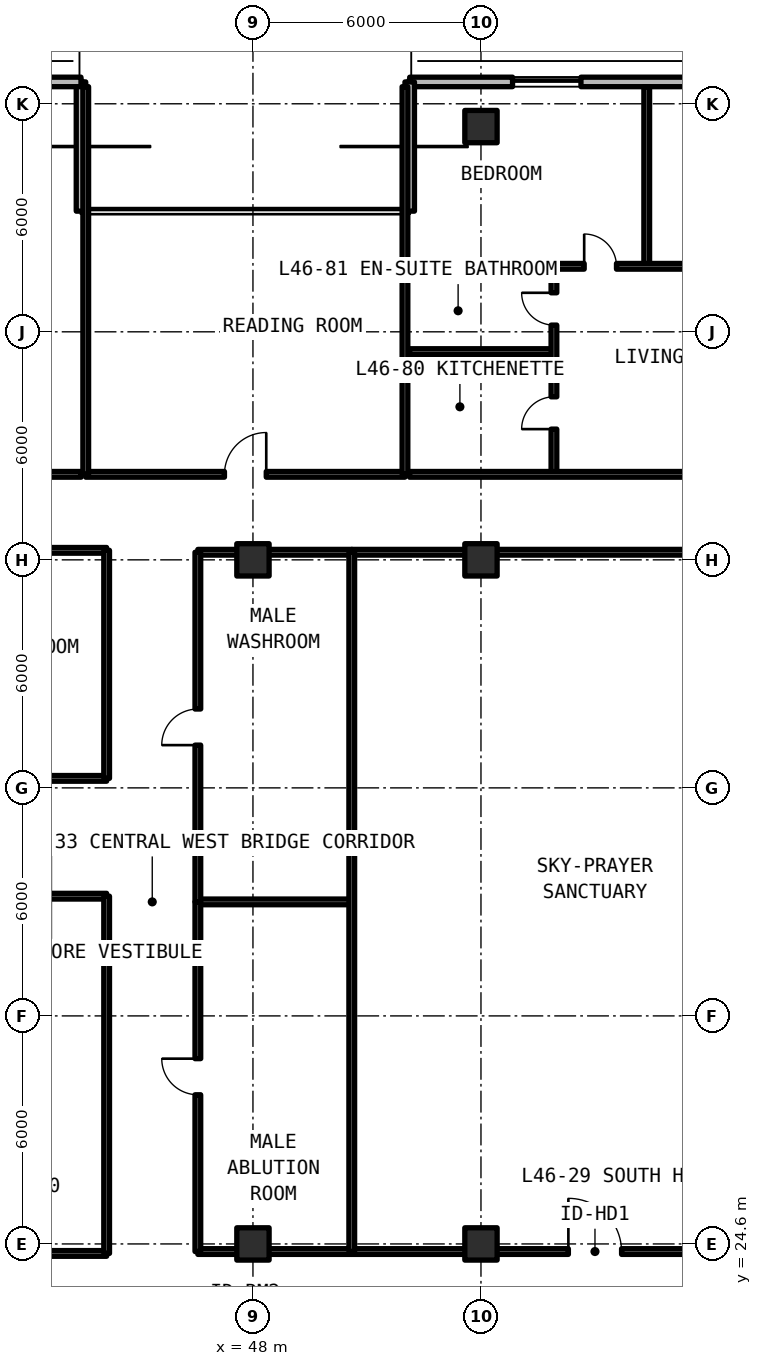
"""IFC4 building model, lengths in metres.
Left out: names, types, materials, properties, quantities, classifications, styles, units other than length and angle.
Written with IfcOpenShell. Run it as: python <this file> out.ifc"""

import sys

from ifc_helpers import new_model, si_unit, direction, frame, frame_2d, origin, origin_2d, place, context, subcontext, project, spatial, rectangle, extrude, element, fill, save


model = new_model("IFC4")
c1 = context("Model", 3, precision=1e-05, world=origin(), true_north=direction((0.0, 1.0)))
c2 = subcontext(c1, "Body", "Model", "MODEL_VIEW")
j1 = project(units=[si_unit("LENGTHUNIT", "METRE"), si_unit("PLANEANGLEUNIT", "RADIAN")], contexts=[c1])
p1 = place(None, origin())
s1 = spatial("IfcSite", under=j1, at=p1, CompositionType="ELEMENT")
p2 = place(p1, origin())
s2 = spatial("IfcBuilding", under=s1, at=p2, CompositionType="ELEMENT")
p3 = place(p2, frame((0.0, 0.0, 165.66)))
s3 = spatial("IfcBuildingStorey", under=s2, at=p3, CompositionType="ELEMENT", Elevation=165.66)
for number, where, z_axis, x_axis in (
    (1, (48.0, 24.6, 0.0), (0.0, 0.0, 1.0), (1.0, 0.0, 0.0)),
    (2, (48.0, 42.6, 0.0), (0.0, 0.0, 1.0), (1.0, 0.0, 0.0)),
    (3, (54.0, 24.6, 0.0), (0.0, 0.0, 1.0), (1.0, 0.0, 0.0)),
    (4, (54.0, 42.6, 0.0), (0.0, 0.0, 1.0), (1.0, 0.0, 0.0)),
    (5, (54.0, 54.0, 0.0), (0.0, 0.0, 1.0), (1.0, 0.0, 0.0)),
):
    element("IfcColumn", number, at=place(p3, frame(where, z_axis=z_axis, x_axis=x_axis)), inside=s3, PredefinedType="COLUMN", context=c2, shape_type="SweptSolid", body=[
        extrude(rectangle(XDim=0.85, YDim=0.85, at=origin_2d()), origin(), (0.0, 0.0, 1.0), 3.63),
    ])
p4 = place(p3, frame((95.748, 55.175, 0.0), z_axis=(0.0, 0.0, 1.0), x_axis=(-1.0, 0.0, 0.0)))
e6 = element("IfcWall", 6, at=p4, inside=s3, PredefinedType="SOLIDWALL", context=c2, shape_type="SweptSolid", body=[
    extrude(rectangle(XDim=43.623, YDim=0.25, at=frame_2d((21.812, 0.0))), origin(), (0.0, 0.0, 1.0), 3.41),
])
p5 = place(p4, frame((26.798, 0.0, 0.0)))
e7 = element("IfcOpeningElement", 7, at=p5, cuts=e6, PredefinedType="OPENING", context=c2, shape_type="SweptSolid", body=[
    extrude(rectangle(XDim=1.1, YDim=2.15, at=frame_2d((0.55, 1.075))), frame((0.0, 0.135, 0.0), z_axis=(0.0, -1.0, 0.0), x_axis=(1.0, 0.0, 0.0)), (0.0, 0.0, 1.0), 0.27),
])
p6 = place(p4, frame((19.448, 0.0, 0.0)))
e8 = element("IfcOpeningElement", 8, at=p6, cuts=e6, PredefinedType="OPENING", context=c2, shape_type="SweptSolid", body=[
    extrude(rectangle(XDim=1.1, YDim=2.15, at=frame_2d((0.55, 1.075))), frame((0.0, 0.135, 0.0), z_axis=(0.0, -1.0, 0.0), x_axis=(1.0, 0.0, 0.0)), (0.0, 0.0, 1.0), 0.27),
])
p7 = place(p4, frame((39.117, 0.0, 0.78)))
e9 = element("IfcOpeningElement", 9, at=p7, cuts=e6, PredefinedType="OPENING", context=c2, shape_type="SweptSolid", body=[
    extrude(rectangle(XDim=1.8, YDim=1.66, at=frame_2d((0.9, 0.83))), frame((0.0, 0.135, 0.0), z_axis=(0.0, -1.0, 0.0), x_axis=(1.0, 0.0, 0.0)), (0.0, 0.0, 1.0), 0.27),
])
p8 = place(p4, frame((33.135, 0.0, 0.78)))
e10 = element("IfcOpeningElement", 10, at=p8, cuts=e6, PredefinedType="OPENING", context=c2, shape_type="SweptSolid", body=[
    extrude(rectangle(XDim=1.8, YDim=1.66, at=frame_2d((0.9, 0.83))), frame((0.0, 0.135, 0.0), z_axis=(0.0, -1.0, 0.0), x_axis=(1.0, 0.0, 0.0)), (0.0, 0.0, 1.0), 0.27),
])
p9 = place(p4, frame((12.563, 0.0, 0.78)))
e11 = element("IfcOpeningElement", 11, at=p9, cuts=e6, PredefinedType="OPENING", context=c2, shape_type="SweptSolid", body=[
    extrude(rectangle(XDim=1.8, YDim=1.66, at=frame_2d((0.9, 0.83))), frame((0.0, 0.135, 0.0), z_axis=(0.0, -1.0, 0.0), x_axis=(1.0, 0.0, 0.0)), (0.0, 0.0, 1.0), 0.27),
])
p10 = place(p4, frame((3.116, 0.0, 0.78)))
e12 = element("IfcOpeningElement", 12, at=p10, cuts=e6, PredefinedType="OPENING", context=c2, shape_type="SweptSolid", body=[
    extrude(rectangle(XDim=1.8, YDim=1.66, at=frame_2d((0.9, 0.83))), frame((0.0, 0.135, 0.0), z_axis=(0.0, -1.0, 0.0), x_axis=(1.0, 0.0, 0.0)), (0.0, 0.0, 1.0), 0.27),
])
for number, where, z_axis, x_axis in (
    (13, (52.125, 55.175, 0.0), (0.0, 0.0, 1.0), (0.0, -1.0, 0.0)),
    (14, (43.475, 51.775, 0.0), (0.0, 0.0, 1.0), (0.0, 1.0, 0.0)),
):
    element("IfcWall", number, at=place(p3, frame(where, z_axis=z_axis, x_axis=x_axis)), inside=s3, PredefinedType="SOLIDWALL", context=c2, shape_type="SweptSolid", body=[
        extrude(rectangle(XDim=3.4, YDim=0.25, at=frame_2d((1.7, 0.0))), origin(), (0.0, 0.0, 1.0), 3.41),
    ])
p11 = place(p3, frame((43.475, 55.175, 0.0), z_axis=(0.0, 0.0, 1.0), x_axis=(-1.0, 0.0, 0.0)))
e15 = element("IfcWall", 15, at=p11, inside=s3, PredefinedType="SOLIDWALL", context=c2, shape_type="SweptSolid", body=[
    extrude(rectangle(XDim=19.623, YDim=0.25, at=frame_2d((9.812, 0.0))), origin(), (0.0, 0.0, 1.0), 3.41),
])
p12 = place(p11, frame((10.575, 0.0, 0.0)))
e16 = element("IfcOpeningElement", 16, at=p12, cuts=e15, PredefinedType="OPENING", context=c2, shape_type="SweptSolid", body=[
    extrude(rectangle(XDim=1.1, YDim=2.15, at=frame_2d((0.55, 1.075))), frame((0.0, 0.135, 0.0), z_axis=(0.0, -1.0, 0.0), x_axis=(1.0, 0.0, 0.0)), (0.0, 0.0, 1.0), 0.27),
])
p13 = place(p11, frame((18.08, 0.0, 0.78)))
e17 = element("IfcOpeningElement", 17, at=p13, cuts=e15, PredefinedType="OPENING", context=c2, shape_type="SweptSolid", body=[
    extrude(rectangle(XDim=0.85, YDim=1.65, at=frame_2d((0.425, 0.825))), frame((0.0, 0.135, 0.0), z_axis=(0.0, -1.0, 0.0), x_axis=(1.0, 0.0, 0.0)), (0.0, 0.0, 1.0), 0.27),
])
p14 = place(p11, frame((15.596, 0.0, 0.78)))
e18 = element("IfcOpeningElement", 18, at=p14, cuts=e15, PredefinedType="OPENING", context=c2, shape_type="SweptSolid", body=[
    extrude(rectangle(XDim=1.4, YDim=1.65, at=frame_2d((0.7, 0.825))), frame((0.0, 0.135, 0.0), z_axis=(0.0, -1.0, 0.0), x_axis=(1.0, 0.0, 0.0)), (0.0, 0.0, 1.0), 0.27),
])
p15 = place(p11, frame((8.369, 0.0, 0.78)))
e19 = element("IfcOpeningElement", 19, at=p15, cuts=e15, PredefinedType="OPENING", context=c2, shape_type="SweptSolid", body=[
    extrude(rectangle(XDim=0.85, YDim=1.65, at=frame_2d((0.425, 0.825))), frame((0.0, 0.135, 0.0), z_axis=(0.0, -1.0, 0.0), x_axis=(1.0, 0.0, 0.0)), (0.0, 0.0, 1.0), 0.27),
])
p16 = place(p11, frame((2.809, 0.0, 0.78)))
e20 = element("IfcOpeningElement", 20, at=p16, cuts=e15, PredefinedType="OPENING", context=c2, shape_type="SweptSolid", body=[
    extrude(rectangle(XDim=1.8, YDim=1.66, at=frame_2d((0.9, 0.83))), frame((0.0, 0.135, 0.0), z_axis=(0.0, -1.0, 0.0), x_axis=(1.0, 0.0, 0.0)), (0.0, 0.0, 1.0), 0.27),
])
p17 = place(p3, frame((36.27, 24.35, 0.0), z_axis=(0.0, 0.0, 1.0), x_axis=(1.0, 0.0, 0.0)))
e21 = element("IfcWall", 21, at=p17, inside=s3, PredefinedType="SOLIDWALL", context=c2, shape_type="SweptSolid", body=[
    extrude(rectangle(XDim=7.88, YDim=0.15, at=frame_2d((3.94, 0.0))), origin(), (0.0, 0.0, 1.0), 2.63),
])
p18 = place(p3, frame((36.27, 33.75, 0.0), z_axis=(0.0, 0.0, 1.0), x_axis=(1.0, 0.0, 0.0)))
e22 = element("IfcWall", 22, at=p18, inside=s3, PredefinedType="SOLIDWALL", context=c2, shape_type="SweptSolid", body=[
    extrude(rectangle(XDim=7.88, YDim=0.15, at=frame_2d((3.94, 0.0))), origin(), (0.0, 0.0, 1.0), 2.63),
])
p19 = place(p18, frame((3.465, 0.0, 0.0)))
e23 = element("IfcOpeningElement", 23, at=p19, cuts=e22, PredefinedType="OPENING", context=c2, shape_type="SweptSolid", body=[
    extrude(rectangle(XDim=0.95, YDim=2.15, at=frame_2d((0.475, 1.075))), frame((0.0, 0.085, 0.0), z_axis=(0.0, -1.0, 0.0), x_axis=(1.0, 0.0, 0.0)), (0.0, 0.0, 1.0), 0.17),
])
p20 = place(p3, frame((44.15, 24.35, 0.0), z_axis=(0.0, 0.0, 1.0), x_axis=(0.0, 1.0, 0.0)))
e24 = element("IfcWall", 24, at=p20, inside=s3, PredefinedType="SOLIDWALL", context=c2, shape_type="SweptSolid", body=[
    extrude(rectangle(XDim=9.4, YDim=0.15, at=frame_2d((4.7, 0.0))), origin(), (0.0, 0.0, 1.0), 2.63),
])
p21 = place(p3, frame((36.27, 36.85, 0.0), z_axis=(0.0, 0.0, 1.0), x_axis=(1.0, 0.0, 0.0)))
e25 = element("IfcWall", 25, at=p21, inside=s3, PredefinedType="SOLIDWALL", context=c2, shape_type="SweptSolid", body=[
    extrude(rectangle(XDim=7.88, YDim=0.15, at=frame_2d((3.94, 0.0))), origin(), (0.0, 0.0, 1.0), 2.63),
])
p22 = place(p21, frame((3.465, 0.0, 0.0)))
e26 = element("IfcOpeningElement", 26, at=p22, cuts=e25, PredefinedType="OPENING", context=c2, shape_type="SweptSolid", body=[
    extrude(rectangle(XDim=0.95, YDim=2.15, at=frame_2d((0.475, 1.075))), frame((0.0, 0.085, 0.0), z_axis=(0.0, -1.0, 0.0), x_axis=(1.0, 0.0, 0.0)), (0.0, 0.0, 1.0), 0.17),
])
p23 = place(p3, frame((36.27, 42.85, 0.0), z_axis=(0.0, 0.0, 1.0), x_axis=(1.0, 0.0, 0.0)))
e27 = element("IfcWall", 27, at=p23, inside=s3, PredefinedType="SOLIDWALL", context=c2, shape_type="SweptSolid", body=[
    extrude(rectangle(XDim=7.88, YDim=0.15, at=frame_2d((3.94, 0.0))), origin(), (0.0, 0.0, 1.0), 2.63),
])
p24 = place(p3, frame((44.15, 36.85, 0.0), z_axis=(0.0, 0.0, 1.0), x_axis=(0.0, 1.0, 0.0)))
e28 = element("IfcWall", 28, at=p24, inside=s3, PredefinedType="SOLIDWALL", context=c2, shape_type="SweptSolid", body=[
    extrude(rectangle(XDim=6.0, YDim=0.15, at=frame_2d((3.0, 0.0))), origin(), (0.0, 0.0, 1.0), 2.63),
])
for number, where, z_axis, x_axis in (
    (29, (46.55, 24.4, 0.0), (0.0, 0.0, 1.0), (1.0, 0.0, 0.0)),
    (30, (46.55, 33.6, 0.0), (0.0, 0.0, 1.0), (1.0, 0.0, 0.0)),
):
    element("IfcWall", number, at=place(p3, frame(where, z_axis=z_axis, x_axis=x_axis)), inside=s3, PredefinedType="SOLIDWALL", context=c2, shape_type="SweptSolid", body=[
        extrude(rectangle(XDim=4.05, YDim=0.15, at=frame_2d((2.025, 0.0))), origin(), (0.0, 0.0, 1.0), 2.63),
    ])
p25 = place(p3, frame((46.55, 24.4, 0.0), z_axis=(0.0, 0.0, 1.0), x_axis=(0.0, 1.0, 0.0)))
e31 = element("IfcWall", 31, at=p25, inside=s3, PredefinedType="SOLIDWALL", context=c2, shape_type="SweptSolid", body=[
    extrude(rectangle(XDim=9.2, YDim=0.15, at=frame_2d((4.6, 0.0))), origin(), (0.0, 0.0, 1.0), 2.63),
])
p26 = place(p25, frame((4.125, 0.0, 0.0)))
e32 = element("IfcOpeningElement", 32, at=p26, cuts=e31, PredefinedType="OPENING", context=c2, shape_type="SweptSolid", body=[
    extrude(rectangle(XDim=0.95, YDim=2.15, at=frame_2d((0.475, 1.075))), frame((0.0, 0.085, 0.0), z_axis=(0.0, -1.0, 0.0), x_axis=(1.0, 0.0, 0.0)), (0.0, 0.0, 1.0), 0.17),
])
p27 = place(p3, frame((46.55, 42.8, 0.0), z_axis=(0.0, 0.0, 1.0), x_axis=(1.0, 0.0, 0.0)))
e33 = element("IfcWall", 33, at=p27, inside=s3, PredefinedType="SOLIDWALL", context=c2, shape_type="SweptSolid", body=[
    extrude(rectangle(XDim=4.05, YDim=0.15, at=frame_2d((2.025, 0.0))), origin(), (0.0, 0.0, 1.0), 2.63),
])
p28 = place(p3, frame((46.55, 33.6, 0.0), z_axis=(0.0, 0.0, 1.0), x_axis=(0.0, 1.0, 0.0)))
e34 = element("IfcWall", 34, at=p28, inside=s3, PredefinedType="SOLIDWALL", context=c2, shape_type="SweptSolid", body=[
    extrude(rectangle(XDim=9.2, YDim=0.15, at=frame_2d((4.6, 0.0))), origin(), (0.0, 0.0, 1.0), 2.63),
])
p29 = place(p28, frame((4.125, 0.0, 0.0)))
e35 = element("IfcOpeningElement", 35, at=p29, cuts=e34, PredefinedType="OPENING", context=c2, shape_type="SweptSolid", body=[
    extrude(rectangle(XDim=0.95, YDim=2.15, at=frame_2d((0.475, 1.075))), frame((0.0, 0.085, 0.0), z_axis=(0.0, -1.0, 0.0), x_axis=(1.0, 0.0, 0.0)), (0.0, 0.0, 1.0), 0.17),
])
p30 = place(p3, frame((50.6, 24.4, 0.0), z_axis=(0.0, 0.0, 1.0), x_axis=(1.0, 0.0, 0.0)))
e36 = element("IfcWall", 36, at=p30, inside=s3, PredefinedType="SOLIDWALL", context=c2, shape_type="SweptSolid", body=[
    extrude(rectangle(XDim=12.8, YDim=0.15, at=frame_2d((6.4, 0.0))), origin(), (0.0, 0.0, 1.0), 2.63),
])
p31 = place(p30, frame((5.7, 0.0, 0.0)))
e37 = element("IfcOpeningElement", 37, at=p31, cuts=e36, PredefinedType="OPENING", context=c2, shape_type="SweptSolid", body=[
    extrude(rectangle(XDim=1.4, YDim=2.15, at=frame_2d((0.7, 1.075))), frame((0.0, 0.085, 0.0), z_axis=(0.0, -1.0, 0.0), x_axis=(1.0, 0.0, 0.0)), (0.0, 0.0, 1.0), 0.17),
])
p32 = place(p3, frame((50.6, 42.8, 0.0), z_axis=(0.0, 0.0, 1.0), x_axis=(1.0, 0.0, 0.0)))
e38 = element("IfcWall", 38, at=p32, inside=s3, PredefinedType="SOLIDWALL", context=c2, shape_type="SweptSolid", body=[
    extrude(rectangle(XDim=12.8, YDim=0.15, at=frame_2d((6.4, 0.0))), origin(), (0.0, 0.0, 1.0), 2.63),
])
p33 = place(p3, frame((50.6, 24.4, 0.0), z_axis=(0.0, 0.0, 1.0), x_axis=(0.0, 1.0, 0.0)))
e39 = element("IfcWall", 39, at=p33, inside=s3, PredefinedType="SOLIDWALL", context=c2, shape_type="SweptSolid", body=[
    extrude(rectangle(XDim=18.4, YDim=0.15, at=frame_2d((9.2, 0.0))), origin(), (0.0, 0.0, 1.0), 2.63),
])
p34 = place(p3, frame((43.6, 44.85, 0.0), z_axis=(0.0, 0.0, 1.0), x_axis=(1.0, 0.0, 0.0)))
e40 = element("IfcWall", 40, at=p34, inside=s3, PredefinedType="SOLIDWALL", context=c2, shape_type="SweptSolid", body=[
    extrude(rectangle(XDim=8.4, YDim=0.15, at=frame_2d((4.2, 0.0))), origin(), (0.0, 0.0, 1.0), 2.63),
])
p35 = place(p34, frame((3.65, 0.0, 0.0)))
e41 = element("IfcOpeningElement", 41, at=p35, cuts=e40, PredefinedType="OPENING", context=c2, shape_type="SweptSolid", body=[
    extrude(rectangle(XDim=1.1, YDim=2.15, at=frame_2d((0.55, 1.075))), frame((0.0, 0.085, 0.0), z_axis=(0.0, -1.0, 0.0), x_axis=(1.0, 0.0, 0.0)), (0.0, 0.0, 1.0), 0.17),
])
for number, where, z_axis, x_axis in (
    (42, (43.6, 44.85, 0.0), (0.0, 0.0, 1.0), (0.0, 1.0, 0.0)),
    (43, (52.0, 44.85, 0.0), (0.0, 0.0, 1.0), (0.0, 1.0, 0.0)),
):
    element("IfcWall", number, at=place(p3, frame(where, z_axis=z_axis, x_axis=x_axis)), inside=s3, PredefinedType="SOLIDWALL", context=c2, shape_type="SweptSolid", body=[
        extrude(rectangle(XDim=10.2, YDim=0.15, at=frame_2d((5.1, 0.0))), origin(), (0.0, 0.0, 1.0), 2.63),
    ])
p36 = place(p3, frame((36.051, 44.85, 0.0), z_axis=(0.0, 0.0, 1.0), x_axis=(1.0, 0.0, 0.0)))
e44 = element("IfcWall", 44, at=p36, inside=s3, PredefinedType="SOLIDWALL", context=c2, shape_type="SweptSolid", body=[
    extrude(rectangle(XDim=7.429, YDim=0.15, at=frame_2d((3.714, 0.0))), origin(), (0.0, 0.0, 1.0), 2.63),
])
p37 = place(p36, frame((3.164, 0.0, 0.0)))
e45 = element("IfcOpeningElement", 45, at=p37, cuts=e44, PredefinedType="OPENING", context=c2, shape_type="SweptSolid", body=[
    extrude(rectangle(XDim=1.1, YDim=2.15, at=frame_2d((0.55, 1.075))), frame((0.0, 0.085, 0.0), z_axis=(0.0, -1.0, 0.0), x_axis=(1.0, 0.0, 0.0)), (0.0, 0.0, 1.0), 0.17),
])
p38 = place(p3, frame((52.12, 48.08, 0.0), z_axis=(0.0, 0.0, 1.0), x_axis=(1.0, 0.0, 0.0)))
e46 = element("IfcWall", 46, at=p38, inside=s3, PredefinedType="PARTITIONING", context=c2, shape_type="SweptSolid", body=[
    extrude(rectangle(XDim=3.8, YDim=0.15, at=frame_2d((1.9, 0.0))), origin(), (0.0, 0.0, 1.0), 2.63),
])
p39 = place(p3, frame((55.92, 44.85, 0.0), z_axis=(0.0, 0.0, 1.0), x_axis=(0.0, 1.0, 0.0)))
e47 = element("IfcWall", 47, at=p39, inside=s3, PredefinedType="PARTITIONING", context=c2, shape_type="SweptSolid", body=[
    extrude(rectangle(XDim=5.474, YDim=0.15, at=frame_2d((2.737, 0.0))), origin(), (0.0, 0.0, 1.0), 2.63),
])
p40 = place(p39, frame((1.19, 0.0, 0.0)))
e48 = element("IfcOpeningElement", 48, at=p40, cuts=e47, PredefinedType="OPENING", context=c2, shape_type="SweptSolid", body=[
    extrude(rectangle(XDim=0.85, YDim=2.1, at=frame_2d((0.425, 1.05))), frame((0.0, 0.085, 0.0), z_axis=(0.0, -1.0, 0.0), x_axis=(1.0, 0.0, 0.0)), (0.0, 0.0, 1.0), 0.17),
])
p41 = place(p39, frame((3.927, 0.0, 0.0)))
e49 = element("IfcOpeningElement", 49, at=p41, cuts=e47, PredefinedType="OPENING", context=c2, shape_type="SweptSolid", body=[
    extrude(rectangle(XDim=0.85, YDim=2.1, at=frame_2d((0.425, 1.05))), frame((0.0, 0.085, 0.0), z_axis=(0.0, -1.0, 0.0), x_axis=(1.0, 0.0, 0.0)), (0.0, 0.0, 1.0), 0.17),
])
p42 = place(p3, frame((58.362, 50.324, 0.0), z_axis=(0.0, 0.0, 1.0), x_axis=(0.0, 1.0, 0.0)))
e50 = element("IfcWall", 50, at=p42, inside=s3, PredefinedType="PARTITIONING", context=c2, shape_type="SweptSolid", body=[
    extrude(rectangle(XDim=4.726, YDim=0.15, at=frame_2d((2.363, 0.0))), origin(), (0.0, 0.0, 1.0), 2.63),
])
p43 = place(p3, frame((52.12, 50.324, 0.0), z_axis=(0.0, 0.0, 1.0), x_axis=(1.0, 0.0, 0.0)))
e51 = element("IfcWall", 51, at=p43, inside=s3, PredefinedType="PARTITIONING", context=c2, shape_type="SweptSolid", body=[
    extrude(rectangle(XDim=12.004, YDim=0.15, at=frame_2d((6.002, 0.0))), origin(), (0.0, 0.0, 1.0), 2.63),
])
p44 = place(p43, frame((4.596, 0.0, 0.0)))
e52 = element("IfcOpeningElement", 52, at=p44, cuts=e51, PredefinedType="OPENING", context=c2, shape_type="SweptSolid", body=[
    extrude(rectangle(XDim=0.85, YDim=2.1, at=frame_2d((0.425, 1.05))), frame((0.0, 0.085, 0.0), z_axis=(0.0, -1.0, 0.0), x_axis=(1.0, 0.0, 0.0)), (0.0, 0.0, 1.0), 0.17),
])
p45 = place(p43, frame((8.698, 0.0, 0.0)))
e53 = element("IfcOpeningElement", 53, at=p45, cuts=e51, PredefinedType="OPENING", context=c2, shape_type="SweptSolid", body=[
    extrude(rectangle(XDim=0.85, YDim=2.1, at=frame_2d((0.425, 1.05))), frame((0.0, 0.085, 0.0), z_axis=(0.0, -1.0, 0.0), x_axis=(1.0, 0.0, 0.0)), (0.0, 0.0, 1.0), 0.17),
])
p46 = place(p3, frame((52.12, 44.85, 0.0), z_axis=(0.0, 0.0, 1.0), x_axis=(1.0, 0.0, 0.0)))
e54 = element("IfcWall", 54, at=p46, inside=s3, PredefinedType="SOLIDWALL", context=c2, shape_type="SweptSolid", body=[
    extrude(rectangle(XDim=12.004, YDim=0.15, at=frame_2d((6.002, 0.0))), origin(), (0.0, 0.0, 1.0), 2.63),
])
p47 = place(p46, frame((7.467, 0.0, 0.0)))
e55 = element("IfcOpeningElement", 55, at=p47, cuts=e54, PredefinedType="OPENING", context=c2, shape_type="SweptSolid", body=[
    extrude(rectangle(XDim=0.95, YDim=2.15, at=frame_2d((0.475, 1.075))), frame((0.0, 0.085, 0.0), z_axis=(0.0, -1.0, 0.0), x_axis=(1.0, 0.0, 0.0)), (0.0, 0.0, 1.0), 0.17),
])
p48 = place(p7, origin())
e56 = element("IfcWindow", 56, at=p48, inside=s3, PartitioningType="SINGLE_PANEL", PredefinedType="WINDOW", context=c2, shape_type="SweptSolid", body=[
    extrude(rectangle(XDim=1.8, YDim=1.66, at=frame_2d((0.9, 0.83))), frame((0.0, 0.03, 0.0), z_axis=(0.0, -1.0, 0.0), x_axis=(1.0, 0.0, 0.0)), (0.0, 0.0, 1.0), 0.06),
])
fill(e9, e56)
p49 = place(p26, origin())
e57 = element("IfcDoor", 57, at=p49, inside=s3, OperationType="SINGLE_SWING_RIGHT", PredefinedType="DOOR", context=c2, shape_type="SweptSolid", body=[
    extrude(rectangle(XDim=0.95, YDim=2.15, at=frame_2d((0.475, 1.075))), frame((0.0, 0.025, 0.0), z_axis=(0.0, -1.0, 0.0), x_axis=(1.0, 0.0, 0.0)), (0.0, 0.0, 1.0), 0.05),
])
fill(e32, e57)
p50 = place(p29, origin())
e58 = element("IfcDoor", 58, at=p50, inside=s3, OperationType="SINGLE_SWING_LEFT", PredefinedType="DOOR", context=c2, shape_type="SweptSolid", body=[
    extrude(rectangle(XDim=0.95, YDim=2.15, at=frame_2d((0.475, 1.075))), frame((0.0, 0.025, 0.0), z_axis=(0.0, -1.0, 0.0), x_axis=(1.0, 0.0, 0.0)), (0.0, 0.0, 1.0), 0.05),
])
fill(e35, e58)
p51 = place(p31, origin())
e59 = element("IfcDoor", 59, at=p51, inside=s3, OperationType="SINGLE_SWING_RIGHT", PredefinedType="DOOR", context=c2, shape_type="SweptSolid", body=[
    extrude(rectangle(XDim=1.4, YDim=2.15, at=frame_2d((0.7, 1.075))), frame((0.0, 0.025, 0.0), z_axis=(0.0, -1.0, 0.0), x_axis=(1.0, 0.0, 0.0)), (0.0, 0.0, 1.0), 0.05),
])
fill(e37, e59)
p52 = place(p35, origin())
e60 = element("IfcDoor", 60, at=p52, inside=s3, OperationType="SINGLE_SWING_RIGHT", PredefinedType="DOOR", context=c2, shape_type="SweptSolid", body=[
    extrude(rectangle(XDim=1.1, YDim=2.15, at=frame_2d((0.55, 1.075))), frame((0.0, 0.025, 0.0), z_axis=(0.0, -1.0, 0.0), x_axis=(1.0, 0.0, 0.0)), (0.0, 0.0, 1.0), 0.05),
])
fill(e41, e60)
p53 = place(p40, origin())
e61 = element("IfcDoor", 61, at=p53, inside=s3, OperationType="SINGLE_SWING_LEFT", PredefinedType="DOOR", context=c2, shape_type="SweptSolid", body=[
    extrude(rectangle(XDim=0.85, YDim=2.1, at=frame_2d((0.425, 1.05))), frame((0.0, 0.025, 0.0), z_axis=(0.0, -1.0, 0.0), x_axis=(1.0, 0.0, 0.0)), (0.0, 0.0, 1.0), 0.05),
])
fill(e48, e61)
p54 = place(p41, origin())
e62 = element("IfcDoor", 62, at=p54, inside=s3, OperationType="SINGLE_SWING_RIGHT", PredefinedType="DOOR", context=c2, shape_type="SweptSolid", body=[
    extrude(rectangle(XDim=0.85, YDim=2.1, at=frame_2d((0.425, 1.05))), frame((0.0, 0.025, 0.0), z_axis=(0.0, -1.0, 0.0), x_axis=(1.0, 0.0, 0.0)), (0.0, 0.0, 1.0), 0.05),
])
fill(e49, e62)
p55 = place(p44, origin())
e63 = element("IfcDoor", 63, at=p55, inside=s3, OperationType="SINGLE_SWING_LEFT", PredefinedType="DOOR", context=c2, shape_type="SweptSolid", body=[
    extrude(rectangle(XDim=0.85, YDim=2.1, at=frame_2d((0.425, 1.05))), frame((0.0, 0.025, 0.0), z_axis=(0.0, -1.0, 0.0), x_axis=(1.0, 0.0, 0.0)), (0.0, 0.0, 1.0), 0.05),
])
fill(e52, e63)
save(model, sys.argv[1])
